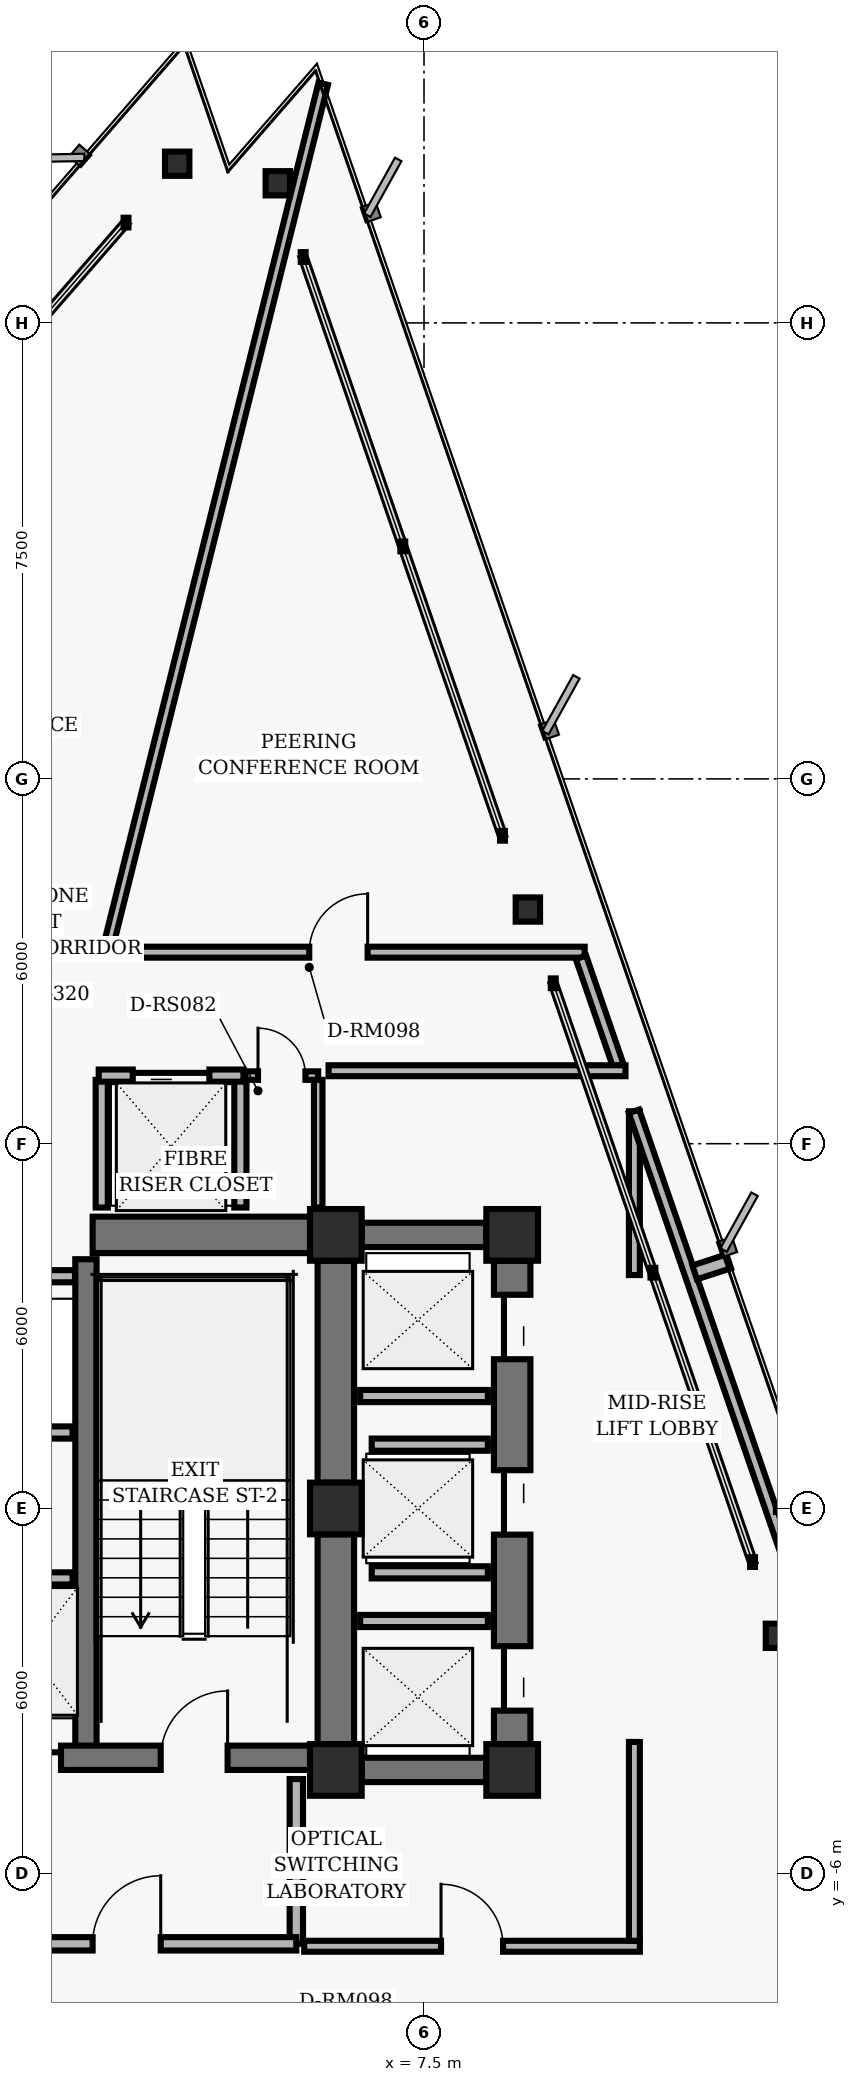
"""IFC4 building model, lengths in metres.
Left out: names, types, materials, properties, quantities, classifications, styles, units other than length and angle.
Written with IfcOpenShell. Run it as: python <this file> out.ifc"""

import sys

from ifc_helpers import new_model, si_unit, direction, frame, frame_2d, origin, origin_2d, place, context, subcontext, project, spatial, rectangle, hollow_rectangle, i_section, extrude, element, fill, save


model = new_model("IFC4")
c1 = context("Model", 3, precision=1e-05, world=origin(), true_north=direction((0.0, 1.0)))
c2 = subcontext(c1, "Body", "Model", "MODEL_VIEW")
j1 = project(units=[si_unit("LENGTHUNIT", "METRE"), si_unit("PLANEANGLEUNIT", "RADIAN")], contexts=[c1])
p1 = place(None, origin())
s1 = spatial("IfcSite", under=j1, at=p1, CompositionType="ELEMENT")
p2 = place(p1, origin())
s2 = spatial("IfcBuilding", under=s1, at=p2, CompositionType="ELEMENT")
p3 = place(p2, frame((0.0, 0.0, 153.28)))
s3 = spatial("IfcBuildingStorey", under=s2, at=p3, CompositionType="ELEMENT", Elevation=153.28)
for number, where, z_axis, x_axis in (
    (1, (6.05, 4.5, 0.0), (0.0, 0.0, 1.0), (1.0, 0.0, 0.0)),
    (2, (6.05, 0.0, 0.0), (0.0, 0.0, 1.0), (1.0, 0.0, 0.0)),
    (3, (6.05, -4.3, 0.0), (0.0, 0.0, 1.0), (1.0, 0.0, 0.0)),
    (4, (8.95, 4.5, 0.0), (0.0, 0.0, 1.0), (1.0, 0.0, 0.0)),
    (5, (8.95, -4.3, 0.0), (0.0, 0.0, 1.0), (1.0, 0.0, 0.0)),
):
    element("IfcColumn", number, at=place(p3, frame(where, z_axis=z_axis, x_axis=x_axis)), inside=s3, PredefinedType="COLUMN", context=c2, shape_type="SweptSolid", body=[
        extrude(hollow_rectangle(XDim=0.85, YDim=0.85, WallThickness=0.055, InnerFilletRadius=0.02, OuterFilletRadius=0.04, at=origin_2d()), origin(), (0.0, 0.0, 1.0), 3.04),
    ])
p4 = place(p3, frame((6.05, 0.425, 0.0), z_axis=(0.0, 0.0, 1.0), x_axis=(0.0, 1.0, 0.0)))
e6 = element("IfcWall", 6, at=p4, inside=s3, PredefinedType="SHEAR", context=c2, shape_type="SweptSolid", body=[
    extrude(rectangle(XDim=3.65, YDim=0.6, at=frame_2d((1.825, 0.0))), origin(), (0.0, 0.0, 1.0), 2.788),
])
p5 = place(p3, frame((6.05, -3.875, 0.0), z_axis=(0.0, 0.0, 1.0), x_axis=(0.0, 1.0, 0.0)))
e7 = element("IfcWall", 7, at=p5, inside=s3, PredefinedType="SHEAR", context=c2, shape_type="SweptSolid", body=[
    extrude(rectangle(XDim=3.45, YDim=0.6, at=frame_2d((1.725, 0.0))), origin(), (0.0, 0.0, 1.0), 2.788),
])
p6 = place(p3, frame((1.94, -4.1, 0.0), z_axis=(0.0, 0.0, 1.0), x_axis=(0.0, 1.0, 0.0)))
e8 = element("IfcWall", 8, at=p6, inside=s3, PredefinedType="SHEAR", context=c2, shape_type="SweptSolid", body=[
    extrude(rectangle(XDim=8.2, YDim=0.35, at=frame_2d((4.1, 0.0))), origin(), (0.0, 0.0, 1.0), 2.788),
])
p7 = place(p3, frame((-5.625, -4.1, 0.0), z_axis=(0.0, 0.0, 1.0), x_axis=(1.0, 0.0, 0.0)))
e9 = element("IfcWall", 9, at=p7, inside=s3, PredefinedType="SHEAR", context=c2, shape_type="SweptSolid", body=[
    extrude(rectangle(XDim=11.25, YDim=0.4, at=frame_2d((5.625, 0.0))), origin(), (0.0, 0.0, 1.0), 2.788),
])
p8 = place(p7, frame((1.355, 0.0, 0.0)))
e10 = element("IfcOpeningElement", 10, at=p8, cuts=e9, PredefinedType="OPENING", context=c2, shape_type="SweptSolid", body=[
    extrude(rectangle(XDim=1.1, YDim=2.04, at=frame_2d((0.55, 1.02))), frame((0.0, 0.21, 0.0), z_axis=(0.0, -1.0, 0.0), x_axis=(1.0, 0.0, 0.0)), (0.0, 0.0, 1.0), 0.42),
])
p9 = place(p7, frame((8.795, 0.0, 0.0)))
e11 = element("IfcOpeningElement", 11, at=p9, cuts=e9, PredefinedType="OPENING", context=c2, shape_type="SweptSolid", body=[
    extrude(rectangle(XDim=1.1, YDim=2.04, at=frame_2d((0.55, 1.02))), frame((0.0, 0.21, 0.0), z_axis=(0.0, -1.0, 0.0), x_axis=(1.0, 0.0, 0.0)), (0.0, 0.0, 1.0), 0.42),
])
p10 = place(p7, frame((4.095, 0.0, 0.0)))
e12 = element("IfcOpeningElement", 12, at=p10, cuts=e9, PredefinedType="OPENING", context=c2, shape_type="SweptSolid", body=[
    extrude(rectangle(XDim=1.06, YDim=2.04, at=frame_2d((0.53, 1.02))), frame((0.0, 0.21, 0.0), z_axis=(0.0, -1.0, 0.0), x_axis=(1.0, 0.0, 0.0)), (0.0, 0.0, 1.0), 0.42),
])
p11 = place(p7, frame((6.095, 0.0, 0.0)))
e13 = element("IfcOpeningElement", 13, at=p11, cuts=e9, PredefinedType="OPENING", context=c2, shape_type="SweptSolid", body=[
    extrude(rectangle(XDim=1.06, YDim=2.04, at=frame_2d((0.53, 1.02))), frame((0.0, 0.21, 0.0), z_axis=(0.0, -1.0, 0.0), x_axis=(1.0, 0.0, 0.0)), (0.0, 0.0, 1.0), 0.42),
])
p12 = place(p3, frame((2.05, 4.5, 0.0), z_axis=(0.0, 0.0, 1.0), x_axis=(1.0, 0.0, 0.0)))
e14 = element("IfcWall", 14, at=p12, inside=s3, PredefinedType="SHEAR", context=c2, shape_type="SweptSolid", body=[
    extrude(rectangle(XDim=3.575, YDim=0.6, at=frame_2d((1.788, 0.0))), origin(), (0.0, 0.0, 1.0), 2.788),
])
p13 = place(p3, frame((8.95, -3.875, 0.0), z_axis=(0.0, 0.0, 1.0), x_axis=(0.0, 1.0, 0.0)))
e15 = element("IfcWall", 15, at=p13, inside=s3, PredefinedType="SHEAR", context=c2, shape_type="SweptSolid", body=[
    extrude(rectangle(XDim=7.95, YDim=0.6, at=frame_2d((3.975, 0.0))), origin(), (0.0, 0.0, 1.0), 2.788),
])
p14 = place(p13, frame((0.55, 0.0, 0.0)))
e16 = element("IfcOpeningElement", 16, at=p14, cuts=e15, PredefinedType="OPENING", context=c2, shape_type="SweptSolid", body=[
    extrude(rectangle(XDim=1.06, YDim=2.04, at=frame_2d((0.53, 1.02))), frame((0.0, 0.31, 0.0), z_axis=(0.0, -1.0, 0.0), x_axis=(1.0, 0.0, 0.0)), (0.0, 0.0, 1.0), 0.62),
])
p15 = place(p13, frame((3.445, 0.0, 0.0)))
e17 = element("IfcOpeningElement", 17, at=p15, cuts=e15, PredefinedType="OPENING", context=c2, shape_type="SweptSolid", body=[
    extrude(rectangle(XDim=1.06, YDim=2.04, at=frame_2d((0.53, 1.02))), frame((0.0, 0.31, 0.0), z_axis=(0.0, -1.0, 0.0), x_axis=(1.0, 0.0, 0.0)), (0.0, 0.0, 1.0), 0.62),
])
p16 = place(p13, frame((6.33, 0.0, 0.0)))
e18 = element("IfcOpeningElement", 18, at=p16, cuts=e15, PredefinedType="OPENING", context=c2, shape_type="SweptSolid", body=[
    extrude(rectangle(XDim=1.06, YDim=2.04, at=frame_2d((0.53, 1.02))), frame((0.0, 0.31, 0.0), z_axis=(0.0, -1.0, 0.0), x_axis=(1.0, 0.0, 0.0)), (0.0, 0.0, 1.0), 0.62),
])
for number, where, z_axis, x_axis in (
    (19, (6.475, 4.5, 0.0), (0.0, 0.0, 1.0), (1.0, 0.0, 0.0)),
    (20, (6.475, -4.3, 0.0), (0.0, 0.0, 1.0), (1.0, 0.0, 0.0)),
):
    element("IfcWall", number, at=place(p3, frame(where, z_axis=z_axis, x_axis=x_axis)), inside=s3, PredefinedType="SHEAR", context=c2, shape_type="SweptSolid", body=[
        extrude(rectangle(XDim=2.05, YDim=0.4, at=frame_2d((1.025, 0.0))), origin(), (0.0, 0.0, 1.0), 2.788),
    ])
for number, where, z_axis, x_axis in (
    (21, (13.321, -2.094, 0.0), (0.0, 0.0, 1.0), (1.0, 0.0, 0.0)),
    (22, (9.208, 9.851, 0.0), (0.0, 0.0, 1.0), (1.0, 0.0, 0.0)),
    (23, (5.095, 21.796, 0.0), (0.0, 0.0, 1.0), (1.0, 0.0, 0.0)),
    (24, (3.441, 22.118, 0.0), (0.0, 0.0, 1.0), (1.0, 0.0, 0.0)),
):
    element("IfcColumn", number, at=place(p3, frame(where, z_axis=z_axis, x_axis=x_axis)), inside=s3, PredefinedType="COLUMN", context=c2, shape_type="SweptSolid", body=[
        extrude(i_section(OverallWidth=0.401, OverallDepth=0.399, WebThickness=0.025, FlangeThickness=0.04, FilletRadius=0.018, at=origin_2d()), origin(), (0.0, 0.0, 1.0), 3.04),
    ])
p17 = place(p3, frame((-1.72, -1.15, 0.0), z_axis=(0.0, 0.0, 1.0), x_axis=(1.0, 0.0, 0.0)))
e25 = element("IfcWall", 25, at=p17, inside=s3, PredefinedType="PARTITIONING", context=c2, shape_type="SweptSolid", body=[
    extrude(rectangle(XDim=3.44, YDim=0.2, at=frame_2d((1.72, 0.0))), origin(), (0.0, 0.0, 1.0), 2.763),
])
p18 = place(p3, frame((5.4, -7.16, 0.0), z_axis=(0.0, 0.0, 1.0), x_axis=(0.0, 1.0, 0.0)))
e26 = element("IfcWall", 26, at=p18, inside=s3, PredefinedType="PARTITIONING", context=c2, shape_type="SweptSolid", body=[
    extrude(rectangle(XDim=2.71, YDim=0.22, at=frame_2d((1.355, 0.0))), origin(), (0.0, 0.0, 1.0), 2.763),
])
p19 = place(p3, frame((0.0, -7.16, 0.0), z_axis=(0.0, 0.0, 1.0), x_axis=(1.0, 0.0, 0.0)))
e27 = element("IfcWall", 27, at=p19, inside=s3, PredefinedType="PARTITIONING", context=c2, shape_type="SweptSolid", body=[
    extrude(rectangle(XDim=5.4, YDim=0.22, at=frame_2d((2.7, 0.0))), origin(), (0.0, 0.0, 1.0), 2.33),
])
p20 = place(p19, frame((2.05, 0.0, 0.0)))
e28 = element("IfcOpeningElement", 28, at=p20, cuts=e27, PredefinedType="OPENING", context=c2, shape_type="SweptSolid", body=[
    extrude(rectangle(XDim=1.12, YDim=2.02, at=frame_2d((0.56, 1.01))), frame((0.0, 0.12, 0.0), z_axis=(0.0, -1.0, 0.0), x_axis=(1.0, 0.0, 0.0)), (0.0, 0.0, 1.0), 0.24),
])
p21 = place(p3, frame((-1.72, 1.25, 0.0), z_axis=(0.0, 0.0, 1.0), x_axis=(1.0, 0.0, 0.0)))
e29 = element("IfcWall", 29, at=p21, inside=s3, PredefinedType="PARTITIONING", context=c2, shape_type="SweptSolid", body=[
    extrude(rectangle(XDim=3.44, YDim=0.2, at=frame_2d((1.72, 0.0))), origin(), (0.0, 0.0, 1.0), 2.763),
])
p22 = place(p3, frame((-1.76, 3.82, 0.0), z_axis=(0.0, 0.0, 1.0), x_axis=(1.0, 0.0, 0.0)))
e30 = element("IfcWall", 30, at=p22, inside=s3, PredefinedType="PARTITIONING", context=c2, shape_type="SweptSolid", body=[
    extrude(rectangle(XDim=3.52, YDim=0.2, at=frame_2d((1.76, 0.0))), origin(), (0.0, 0.0, 1.0), 2.763),
])
for number, where, z_axis, x_axis in (
    (31, (2.2, 4.95, 0.0), (0.0, 0.0, 1.0), (0.0, 1.0, 0.0)),
    (32, (4.48, 4.95, 0.0), (0.0, 0.0, 1.0), (0.0, 1.0, 0.0)),
):
    element("IfcWall", number, at=place(p3, frame(where, z_axis=z_axis, x_axis=x_axis)), inside=s3, PredefinedType="PARTITIONING", context=c2, shape_type="SweptSolid", body=[
        extrude(rectangle(XDim=2.1, YDim=0.2, at=frame_2d((1.05, 0.0))), origin(), (0.0, 0.0, 1.0), 2.763),
    ])
p23 = place(p3, frame((2.15, 7.12, 0.0), z_axis=(0.0, 0.0, 1.0), x_axis=(1.0, 0.0, 0.0)))
e33 = element("IfcWall", 33, at=p23, inside=s3, PredefinedType="PARTITIONING", context=c2, shape_type="SweptSolid", body=[
    extrude(rectangle(XDim=2.38, YDim=0.2, at=frame_2d((1.19, 0.0))), origin(), (0.0, 0.0, 1.0), 2.763),
])
p24 = place(p23, frame((0.56, 0.0, 0.0)))
e34 = element("IfcOpeningElement", 34, at=p24, cuts=e33, PredefinedType="OPENING", context=c2, shape_type="SweptSolid", body=[
    extrude(rectangle(XDim=1.26, YDim=2.06, at=frame_2d((0.63, 1.03))), frame((0.0, 0.11, 0.0), z_axis=(0.0, -1.0, 0.0), x_axis=(1.0, 0.0, 0.0)), (0.0, 0.0, 1.0), 0.22),
])
p25 = place(p3, frame((5.76, 4.95, 0.0), z_axis=(0.0, 0.0, 1.0), x_axis=(0.0, 1.0, 0.0)))
e35 = element("IfcWall", 35, at=p25, inside=s3, PredefinedType="PARTITIONING", context=c2, shape_type="SweptSolid", body=[
    extrude(rectangle(XDim=2.1, YDim=0.14, at=frame_2d((1.05, 0.0))), origin(), (0.0, 0.0, 1.0), 2.763),
])
p26 = place(p3, frame((4.56, 7.12, 0.0), z_axis=(0.0, 0.0, 1.0), x_axis=(1.0, 0.0, 0.0)))
e36 = element("IfcWall", 36, at=p26, inside=s3, PredefinedType="PARTITIONING", context=c2, shape_type="SweptSolid", body=[
    extrude(rectangle(XDim=1.2, YDim=0.14, at=frame_2d((0.6, 0.0))), origin(), (0.0, 0.0, 1.0), 2.763),
])
p27 = place(p26, frame((0.21, 0.0, 0.0)))
e37 = element("IfcOpeningElement", 37, at=p27, cuts=e36, PredefinedType="OPENING", context=c2, shape_type="SweptSolid", body=[
    extrude(rectangle(XDim=0.78, YDim=2.01, at=frame_2d((0.39, 1.005))), frame((0.0, 0.08, 0.0), z_axis=(0.0, -1.0, 0.0), x_axis=(1.0, 0.0, 0.0)), (0.0, 0.0, 1.0), 0.16),
])
for number, where, z_axis, x_axis in (
    (38, (6.45, -1.85, 0.0), (0.0, 0.0, 1.0), (1.0, 0.0, 0.0)),
    (39, (6.45, 1.85, 0.0), (0.0, 0.0, 1.0), (1.0, 0.0, 0.0)),
):
    element("IfcWall", number, at=place(p3, frame(where, z_axis=z_axis, x_axis=x_axis)), inside=s3, PredefinedType="PARTITIONING", context=c2, shape_type="SweptSolid", body=[
        extrude(rectangle(XDim=2.1, YDim=0.2, at=frame_2d((1.05, 0.0))), origin(), (0.0, 0.0, 1.0), 2.763),
    ])
for number, where, z_axis, x_axis in (
    (40, (6.64, -1.05, 0.0), (0.0, 0.0, 1.0), (1.0, 0.0, 0.0)),
    (41, (6.64, 1.05, 0.0), (0.0, 0.0, 1.0), (1.0, 0.0, 0.0)),
):
    element("IfcWall", number, at=place(p3, frame(where, z_axis=z_axis, x_axis=x_axis)), inside=s3, PredefinedType="PARTITIONING", context=c2, shape_type="SweptSolid", body=[
        extrude(rectangle(XDim=1.91, YDim=0.2, at=frame_2d((0.955, 0.0))), origin(), (0.0, 0.0, 1.0), 2.763),
    ])
p28 = place(p3, frame((-6.52, 9.15, 0.0), z_axis=(0.0, 0.0, 1.0), x_axis=(1.0, 0.0, 0.0)))
e42 = element("IfcWall", 42, at=p28, inside=s3, PredefinedType="PARTITIONING", context=c2, shape_type="SweptSolid", body=[
    extrude(rectangle(XDim=16.662, YDim=0.18, at=frame_2d((8.331, 0.0))), origin(), (0.0, 0.0, 1.0), 2.763),
])
p29 = place(p28, frame((12.133, 0.0, 0.0)))
e43 = element("IfcOpeningElement", 43, at=p29, cuts=e42, PredefinedType="OPENING", context=c2, shape_type="SweptSolid", body=[
    extrude(rectangle(XDim=0.96, YDim=2.02, at=frame_2d((0.48, 1.01))), frame((0.0, 0.1, 0.0), z_axis=(0.0, -1.0, 0.0), x_axis=(1.0, 0.0, 0.0)), (0.0, 0.0, 1.0), 0.2),
])
p30 = place(p28, frame((4.06, 0.0, 0.0)))
e44 = element("IfcOpeningElement", 44, at=p30, cuts=e42, PredefinedType="OPENING", context=c2, shape_type="SweptSolid", body=[
    extrude(rectangle(XDim=0.96, YDim=2.02, at=frame_2d((0.48, 1.01))), frame((0.0, 0.1, 0.0), z_axis=(0.0, -1.0, 0.0), x_axis=(1.0, 0.0, 0.0)), (0.0, 0.0, 1.0), 0.2),
])
p31 = place(p3, frame((10.082, 9.065, 0.0), z_axis=(0.0, 0.0, 1.0), x_axis=(0.325550958337, -0.945524496524, 0.0)))
e45 = element("IfcWall", 45, at=p31, inside=s3, PredefinedType="PARTITIONING", context=c2, shape_type="SweptSolid", body=[
    extrude(rectangle(XDim=1.882, YDim=0.18, at=frame_2d((0.941, 0.0))), origin(), (0.0, 0.0, 1.0), 2.763),
])
p32 = place(p3, frame((10.814, 7.2, 0.0), z_axis=(0.0, 0.0, 1.0), x_axis=(-1.0, 0.0, 0.0)))
e46 = element("IfcWall", 46, at=p32, inside=s3, PredefinedType="PARTITIONING", context=c2, shape_type="SweptSolid", body=[
    extrude(rectangle(XDim=4.884, YDim=0.18, at=frame_2d((2.442, 0.0))), origin(), (0.0, 0.0, 1.0), 2.763),
])
p33 = place(p3, frame((5.53, -7.2, 0.0), z_axis=(0.0, 0.0, 1.0), x_axis=(1.0, 0.0, 0.0)))
e47 = element("IfcWall", 47, at=p33, inside=s3, PredefinedType="PARTITIONING", context=c2, shape_type="SweptSolid", body=[
    extrude(rectangle(XDim=5.52, YDim=0.18, at=frame_2d((2.76, 0.0))), origin(), (0.0, 0.0, 1.0), 2.33),
])
p34 = place(p33, frame((2.25, 0.0, 0.0)))
e48 = element("IfcOpeningElement", 48, at=p34, cuts=e47, PredefinedType="OPENING", context=c2, shape_type="SweptSolid", body=[
    extrude(rectangle(XDim=1.02, YDim=2.02, at=frame_2d((0.51, 1.01))), frame((0.0, 0.1, 0.0), z_axis=(0.0, -1.0, 0.0), x_axis=(1.0, 0.0, 0.0)), (0.0, 0.0, 1.0), 0.2),
])
p35 = place(p3, frame((10.96, -7.11, 0.0), z_axis=(0.0, 0.0, 1.0), x_axis=(0.0, 1.0, 0.0)))
e49 = element("IfcWall", 49, at=p35, inside=s3, PredefinedType="PARTITIONING", context=c2, shape_type="SweptSolid", body=[
    extrude(rectangle(XDim=3.271, YDim=0.18, at=frame_2d((1.635, 0.0))), origin(), (0.0, 0.0, 1.0), 2.763),
])
p36 = place(p3, frame((10.96, 3.84, 0.0), z_axis=(0.0, 0.0, 1.0), x_axis=(0.0, 1.0, 0.0)))
e50 = element("IfcWall", 50, at=p36, inside=s3, PredefinedType="PARTITIONING", context=c2, shape_type="SweptSolid", body=[
    extrude(rectangle(XDim=2.694, YDim=0.18, at=frame_2d((1.347, 0.0))), origin(), (0.0, 0.0, 1.0), 2.33),
])
p37 = place(p3, frame((10.954, 6.533, 0.0), z_axis=(0.0, 0.0, 1.0), x_axis=(0.325553439946, -0.945523642084, 0.0)))
e51 = element("IfcWall", 51, at=p37, inside=s3, PredefinedType="PARTITIONING", context=c2, shape_type="SweptSolid", body=[
    extrude(rectangle(XDim=11.22, YDim=0.18, at=frame_2d((5.61, 0.0))), origin(), (0.0, 0.0, 1.0), 2.763),
])
p38 = place(p3, frame((13.288, 0.0, 0.0), z_axis=(0.0, 0.0, 1.0), x_axis=(1.0, 0.0, 0.0)))
e52 = element("IfcWall", 52, at=p38, inside=s3, PredefinedType="MOVABLE", context=c2, shape_type="SweptSolid", body=[
    extrude(rectangle(XDim=0.624, YDim=0.115, at=frame_2d((0.312, 0.0))), origin(), (0.0, 0.0, 1.0), 2.763),
])
p39 = place(p3, frame((11.95, 3.883, 0.0), z_axis=(0.0, 0.0, 1.0), x_axis=(0.951055346906, 0.309020593362, 0.0)))
e53 = element("IfcWall", 53, at=p39, inside=s3, PredefinedType="PARTITIONING", context=c2, shape_type="SweptSolid", body=[
    extrude(rectangle(XDim=0.59, YDim=0.24, at=frame_2d((0.295, 0.0))), origin(), (0.0, 0.0, 1.0), 2.763),
])
p40 = place(p3, frame((2.301, 9.23, 0.0), z_axis=(0.0, 0.0, 1.0), x_axis=(0.241931245301, 0.970293395086, 0.0)))
e54 = element("IfcWall", 54, at=p40, inside=s3, PredefinedType="PARTITIONING", context=c2, shape_type="SweptSolid", body=[
    extrude(rectangle(XDim=14.638, YDim=0.16, at=frame_2d((7.319, 0.0))), origin(), (0.0, 0.0, 1.0), 2.763),
])
p41 = place(p9, origin())
e55 = element("IfcDoor", 55, at=p41, inside=s3, OperationType="SINGLE_SWING_RIGHT", PredefinedType="DOOR", context=c2, shape_type="SweptSolid", body=[
    extrude(rectangle(XDim=1.1, YDim=2.04, at=frame_2d((0.55, 1.02))), frame((0.0, 0.025, 0.0), z_axis=(0.0, -1.0, 0.0), x_axis=(1.0, 0.0, 0.0)), (0.0, 0.0, 1.0), 0.05),
])
fill(e11, e55)
p42 = place(p11, origin())
e56 = element("IfcDoor", 56, at=p42, inside=s3, OperationType="SLIDING_TO_RIGHT", PredefinedType="DOOR", context=c2, shape_type="SweptSolid", body=[
    extrude(rectangle(XDim=1.06, YDim=2.04, at=frame_2d((0.53, 1.02))), frame((0.0, 0.025, 0.0), z_axis=(0.0, -1.0, 0.0), x_axis=(1.0, 0.0, 0.0)), (0.0, 0.0, 1.0), 0.05),
])
fill(e13, e56)
p43 = place(p20, origin())
e57 = element("IfcDoor", 57, at=p43, inside=s3, OperationType="SINGLE_SWING_RIGHT", PredefinedType="DOOR", context=c2, shape_type="SweptSolid", body=[
    extrude(rectangle(XDim=1.12, YDim=2.02, at=frame_2d((0.56, 1.01))), frame((0.0, 0.025, 0.0), z_axis=(0.0, -1.0, 0.0), x_axis=(1.0, 0.0, 0.0)), (0.0, 0.0, 1.0), 0.05),
])
fill(e28, e57)
p44 = place(p24, origin())
e58 = element("IfcDoor", 58, at=p44, inside=s3, OperationType="SLIDING_TO_LEFT", PredefinedType="DOOR", context=c2, shape_type="SweptSolid", body=[
    extrude(rectangle(XDim=1.26, YDim=2.06, at=frame_2d((0.63, 1.03))), frame((0.0, 0.025, 0.0), z_axis=(0.0, -1.0, 0.0), x_axis=(1.0, 0.0, 0.0)), (0.0, 0.0, 1.0), 0.05),
])
fill(e34, e58)
p45 = place(p27, origin())
e59 = element("IfcDoor", 59, at=p45, inside=s3, OperationType="SINGLE_SWING_LEFT", PredefinedType="DOOR", context=c2, shape_type="SweptSolid", body=[
    extrude(rectangle(XDim=0.78, YDim=2.01, at=frame_2d((0.39, 1.005))), frame((0.0, 0.025, 0.0), z_axis=(0.0, -1.0, 0.0), x_axis=(1.0, 0.0, 0.0)), (0.0, 0.0, 1.0), 0.05),
])
fill(e37, e59)
p46 = place(p14, origin())
e60 = element("IfcDoor", 60, at=p46, inside=s3, OperationType="SLIDING_TO_LEFT", PredefinedType="DOOR", context=c2, shape_type="SweptSolid", body=[
    extrude(rectangle(XDim=1.06, YDim=2.04, at=frame_2d((0.53, 1.02))), frame((0.0, 0.025, 0.0), z_axis=(0.0, -1.0, 0.0), x_axis=(1.0, 0.0, 0.0)), (0.0, 0.0, 1.0), 0.05),
])
fill(e16, e60)
p47 = place(p15, origin())
e61 = element("IfcDoor", 61, at=p47, inside=s3, OperationType="SLIDING_TO_RIGHT", PredefinedType="DOOR", context=c2, shape_type="SweptSolid", body=[
    extrude(rectangle(XDim=1.06, YDim=2.04, at=frame_2d((0.53, 1.02))), frame((0.0, 0.025, 0.0), z_axis=(0.0, -1.0, 0.0), x_axis=(1.0, 0.0, 0.0)), (0.0, 0.0, 1.0), 0.05),
])
fill(e17, e61)
p48 = place(p16, origin())
e62 = element("IfcDoor", 62, at=p48, inside=s3, OperationType="SLIDING_TO_LEFT", PredefinedType="DOOR", context=c2, shape_type="SweptSolid", body=[
    extrude(rectangle(XDim=1.06, YDim=2.04, at=frame_2d((0.53, 1.02))), frame((0.0, 0.025, 0.0), z_axis=(0.0, -1.0, 0.0), x_axis=(1.0, 0.0, 0.0)), (0.0, 0.0, 1.0), 0.05),
])
fill(e18, e62)
p49 = place(p34, origin())
e63 = element("IfcDoor", 63, at=p49, inside=s3, OperationType="SINGLE_SWING_LEFT", PredefinedType="DOOR", context=c2, shape_type="SweptSolid", body=[
    extrude(rectangle(XDim=1.02, YDim=2.02, at=frame_2d((0.51, 1.01))), frame((0.0, 0.025, 0.0), z_axis=(0.0, -1.0, 0.0), x_axis=(1.0, 0.0, 0.0)), (0.0, 0.0, 1.0), 0.05),
])
fill(e48, e63)
p50 = place(p29, origin())
e64 = element("IfcDoor", 64, at=p50, inside=s3, OperationType="SINGLE_SWING_RIGHT", PredefinedType="DOOR", context=c2, shape_type="SweptSolid", body=[
    extrude(rectangle(XDim=0.96, YDim=2.02, at=frame_2d((0.48, 1.01))), frame((0.0, 0.025, 0.0), z_axis=(0.0, -1.0, 0.0), x_axis=(1.0, 0.0, 0.0)), (0.0, 0.0, 1.0), 0.05),
])
fill(e43, e64)
save(model, sys.argv[1])
